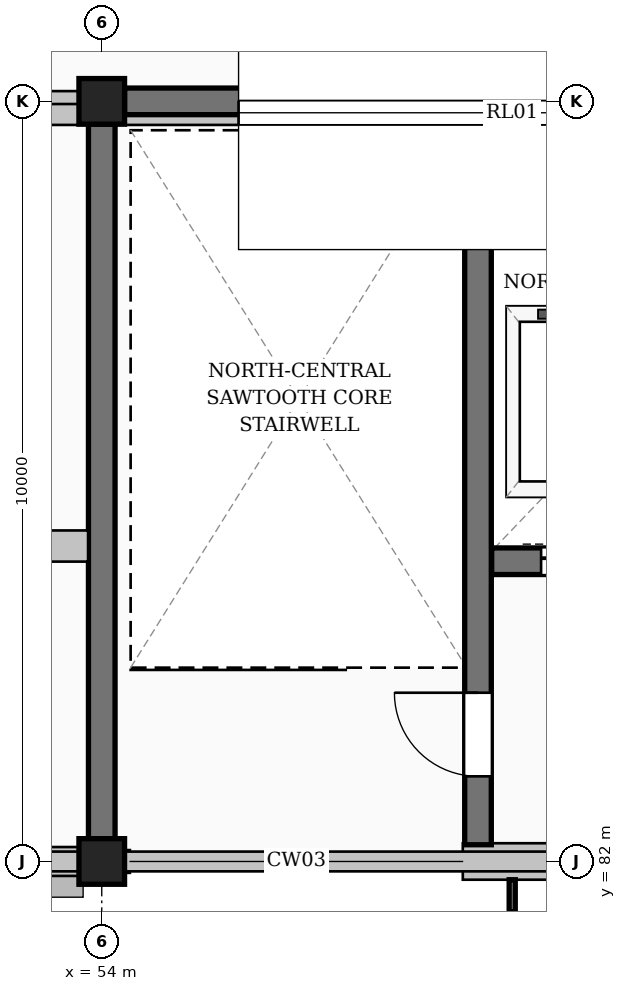
"""IFC4 building model, lengths in metres.
Left out: names, types, materials, properties, quantities, classifications, styles, units other than length and angle.
Written with IfcOpenShell. Run it as: python <this file> out.ifc"""

import sys

from ifc_helpers import new_model, si_unit, direction, frame, frame_2d, origin, origin_2d, place, context, subcontext, project, spatial, rectangle, extrude, element, fill, save


model = new_model("IFC4")
c1 = context("Model", 3, precision=1e-05, world=origin(), true_north=direction((0.0, 1.0)))
c2 = subcontext(c1, "Body", "Model", "MODEL_VIEW")
j1 = project(units=[si_unit("LENGTHUNIT", "METRE"), si_unit("PLANEANGLEUNIT", "RADIAN")], contexts=[c1])
p1 = place(None, origin())
s1 = spatial("IfcSite", under=j1, at=p1, CompositionType="ELEMENT")
p2 = place(p1, origin())
s2 = spatial("IfcBuilding", under=s1, at=p2, CompositionType="ELEMENT")
p3 = place(p2, frame((0.0, 0.0, 28.8)))
s3 = spatial("IfcBuildingStorey", under=s2, at=p3, CompositionType="ELEMENT", Elevation=28.8)
for number, where, z_axis, x_axis in (
    (1, (54.0, 82.0, 0.0), (0.0, 0.0, 1.0), (1.0, 0.0, 0.0)),
    (2, (54.0, 92.0, 0.0), (0.0, 0.0, 1.0), (1.0, 0.0, 0.0)),
):
    element("IfcColumn", number, at=place(p3, frame(where, z_axis=z_axis, x_axis=x_axis)), inside=s3, PredefinedType="COLUMN", context=c2, shape_type="SweptSolid", body=[
        extrude(rectangle(XDim=0.6, YDim=0.6, at=origin_2d()), origin(), (0.0, 0.0, 1.0), 5.4),
    ])
p4 = place(p3, frame((43.345, 82.0, 0.0), z_axis=(0.0, 0.0, 1.0), x_axis=(1.0, 0.0, 0.0)))
e3 = element("IfcWall", 3, at=p4, inside=s3, PredefinedType="STANDARD", context=c2, shape_type="SweptSolid", body=[
    extrude(rectangle(XDim=10.51, YDim=0.38, at=frame_2d((5.255, 0.0))), origin(), (0.0, 0.0, 1.0), 5.044),
])
p5 = place(p4, frame((4.155, 0.0, 1.0)))
e4 = element("IfcOpeningElement", 4, at=p5, cuts=e3, PredefinedType="OPENING", context=c2, shape_type="SweptSolid", body=[
    extrude(rectangle(XDim=2.2, YDim=3.0, at=frame_2d((1.1, 1.5))), frame((0.0, 0.2, 0.0), z_axis=(0.0, -1.0, 0.0), x_axis=(1.0, 0.0, 0.0)), (0.0, 0.0, 1.0), 0.4),
])
p6 = place(p3, frame((58.75, 82.0, 0.0), z_axis=(0.0, 0.0, 1.0), x_axis=(1.0, 0.0, 0.0)))
e5 = element("IfcWall", 5, at=p6, inside=s3, PredefinedType="STANDARD", context=c2, shape_type="SweptSolid", body=[
    extrude(rectangle(XDim=1.3, YDim=0.48, at=frame_2d((0.65, 0.0))), origin(), (0.0, 0.0, 1.0), 5.044),
])
p7 = place(p3, frame((54.145, 82.0, 0.0), z_axis=(0.0, 0.0, 1.0), x_axis=(1.0, 0.0, 0.0)))
e6 = element("IfcWall", 6, at=p7, inside=s3, PredefinedType="STANDARD", context=c2, shape_type="SweptSolid", body=[
    extrude(rectangle(XDim=0.225, YDim=0.3, at=frame_2d((0.113, 0.0))), origin(), (0.0, 0.0, 1.0), 5.16),
])
p8 = place(p3, frame((43.36, 91.85, 5.4), z_axis=(0.0, 0.0, 1.0), x_axis=(1.0, 0.0, 0.0)))
e7 = element("IfcWall", 7, at=p8, inside=s3, PredefinedType="STANDARD", context=c2, shape_type="SweptSolid", body=[
    extrude(rectangle(XDim=10.48, YDim=0.32, at=frame_2d((5.24, 0.0))), origin(), (0.0, 0.0, 1.0), 2.45),
])
p9 = place(p8, frame((1.64, 0.0, 0.45)))
e8 = element("IfcOpeningElement", 8, at=p9, cuts=e7, PredefinedType="OPENING", context=c2, shape_type="SweptSolid", body=[
    extrude(rectangle(XDim=7.2, YDim=1.5, at=frame_2d((3.6, 0.75))), frame((0.0, 0.17, 0.0), z_axis=(0.0, -1.0, 0.0), x_axis=(1.0, 0.0, 0.0)), (0.0, 0.0, 1.0), 0.34),
])
p10 = place(p3, frame((54.16, 91.85, 5.4), z_axis=(0.0, 0.0, 1.0), x_axis=(1.0, 0.0, 0.0)))
e9 = element("IfcWall", 9, at=p10, inside=s3, PredefinedType="STANDARD", context=c2, shape_type="SweptSolid", body=[
    extrude(rectangle(XDim=10.48, YDim=0.32, at=frame_2d((5.24, 0.0))), origin(), (0.0, 0.0, 1.0), 2.45),
])
p11 = place(p10, frame((1.64, 0.0, 0.45)))
e10 = element("IfcOpeningElement", 10, at=p11, cuts=e9, PredefinedType="OPENING", context=c2, shape_type="SweptSolid", body=[
    extrude(rectangle(XDim=7.2, YDim=1.5, at=frame_2d((3.6, 0.75))), frame((0.0, 0.17, 0.0), z_axis=(0.0, -1.0, 0.0), x_axis=(1.0, 0.0, 0.0)), (0.0, 0.0, 1.0), 0.34),
])
p12 = place(p3, frame((0.35, 82.0, 5.22), z_axis=(0.0, 0.0, 1.0), x_axis=(1.0, 0.0, 0.0)))
e11 = element("IfcWall", 11, at=p12, inside=s3, PredefinedType="PARAPET", context=c2, shape_type="SweptSolid", body=[
    extrude(rectangle(XDim=74.9, YDim=0.26, at=frame_2d((37.45, 0.0))), origin(), (0.0, 0.0, 1.0), 0.55),
])
p13 = place(p3, frame((54.3, 92.0, 0.0), z_axis=(0.0, 0.0, 1.0), x_axis=(1.0, 0.0, 0.0)))
e12 = element("IfcWall", 12, at=p13, inside=s3, PredefinedType="SHEAR", context=c2, shape_type="SweptSolid", body=[
    extrude(rectangle(XDim=10.2, YDim=0.35, at=frame_2d((5.1, 0.0))), origin(), (0.0, 0.0, 1.0), 5.16),
])
p14 = place(p3, frame((54.0, 82.3, 0.0), z_axis=(0.0, 0.0, 1.0), x_axis=(0.0, 1.0, 0.0)))
e13 = element("IfcWall", 13, at=p14, inside=s3, PredefinedType="SHEAR", context=c2, shape_type="SweptSolid", body=[
    extrude(rectangle(XDim=9.4, YDim=0.35, at=frame_2d((4.7, 0.0))), origin(), (0.0, 0.0, 1.0), 5.16),
])
p15 = place(p3, frame((58.95, 82.22, 0.0), z_axis=(0.0, 0.0, 1.0), x_axis=(0.0, 1.0, 0.0)))
e14 = element("IfcWall", 14, at=p15, inside=s3, PredefinedType="SHEAR", context=c2, shape_type="SweptSolid", body=[
    extrude(rectangle(XDim=9.605, YDim=0.35, at=frame_2d((4.802, 0.0))), origin(), (0.0, 0.0, 1.0), 5.16),
])
p16 = place(p15, frame((0.9, 0.0, 0.0)))
e15 = element("IfcOpeningElement", 15, at=p16, cuts=e14, PredefinedType="OPENING", context=c2, shape_type="SweptSolid", body=[
    extrude(rectangle(XDim=1.1, YDim=2.2, at=frame_2d((0.55, 1.1))), frame((0.0, 0.185, 0.0), z_axis=(0.0, -1.0, 0.0), x_axis=(1.0, 0.0, 0.0)), (0.0, 0.0, 1.0), 0.37),
])
p17 = place(p3, frame((59.13, 85.95, 0.0), z_axis=(0.0, 0.0, 1.0), x_axis=(1.0, 0.0, 0.0)))
e16 = element("IfcWall", 16, at=p17, inside=s3, PredefinedType="SHEAR", context=c2, shape_type="SweptSolid", body=[
    extrude(rectangle(XDim=5.49, YDim=0.35, at=frame_2d((2.745, 0.0))), origin(), (0.0, 0.0, 1.0), 5.16),
])
p18 = place(p17, frame((0.65, 0.0, 0.0)))
e17 = element("IfcOpeningElement", 17, at=p18, cuts=e16, PredefinedType="OPENING", context=c2, shape_type="SweptSolid", body=[
    extrude(rectangle(XDim=1.1, YDim=2.2, at=frame_2d((0.55, 1.1))), frame((0.0, 0.185, 0.0), z_axis=(0.0, -1.0, 0.0), x_axis=(1.0, 0.0, 0.0)), (0.0, 0.0, 1.0), 0.37),
])
p19 = place(p17, frame((2.85, 0.0, 0.0)))
e18 = element("IfcOpeningElement", 18, at=p19, cuts=e16, PredefinedType="OPENING", context=c2, shape_type="SweptSolid", body=[
    extrude(rectangle(XDim=2.0, YDim=2.5, at=frame_2d((1.0, 1.25))), frame((0.0, 0.185, 0.0), z_axis=(0.0, -1.0, 0.0), x_axis=(1.0, 0.0, 0.0)), (0.0, 0.0, 1.0), 0.37),
])
p20 = place(p3, frame((25.6, 86.15, 0.0), z_axis=(0.0, 0.0, 1.0), x_axis=(1.0, 0.0, 0.0)))
e19 = element("IfcWall", 19, at=p20, inside=s3, PredefinedType="PARTITIONING", context=c2, shape_type="SweptSolid", body=[
    extrude(rectangle(XDim=28.22, YDim=0.41, at=frame_2d((14.11, 0.0))), origin(), (0.0, 0.0, 1.0), 5.12),
])
p21 = place(p20, frame((13.235, 0.0, 0.0)))
e20 = element("IfcOpeningElement", 20, at=p21, cuts=e19, PredefinedType="OPENING", context=c2, shape_type="SweptSolid", body=[
    extrude(rectangle(XDim=1.75, YDim=2.45, at=frame_2d((0.875, 1.225))), frame((0.0, 0.215, 0.0), z_axis=(0.0, -1.0, 0.0), x_axis=(1.0, 0.0, 0.0)), (0.0, 0.0, 1.0), 0.43),
])
p22 = place(p3, frame((43.4, 92.05, 0.0), z_axis=(0.0, 0.0, 1.0), x_axis=(1.0, 0.0, 0.0)))
e21 = element("IfcWall", 21, at=p22, inside=s3, PredefinedType="PARTITIONING", context=c2, shape_type="SweptSolid", body=[
    extrude(rectangle(XDim=10.42, YDim=0.17, at=frame_2d((5.21, 0.0))), origin(), (0.0, 0.0, 1.0), 5.044),
])
p23 = place(p22, frame((4.01, 0.0, 0.0)))
e22 = element("IfcOpeningElement", 22, at=p23, cuts=e21, PredefinedType="OPENING", context=c2, shape_type="SweptSolid", body=[
    extrude(rectangle(XDim=2.4, YDim=2.8, at=frame_2d((1.2, 1.4))), frame((0.0, 0.095, 0.0), z_axis=(0.0, -1.0, 0.0), x_axis=(1.0, 0.0, 0.0)), (0.0, 0.0, 1.0), 0.19),
])
p24 = place(p11, origin())
e23 = element("IfcWindow", 23, at=p24, inside=s3, PartitioningType="SINGLE_PANEL", PredefinedType="SKYLIGHT", context=c2, shape_type="SweptSolid", body=[
    extrude(rectangle(XDim=7.2, YDim=1.5, at=frame_2d((3.6, 0.75))), frame((0.0, 0.03, 0.0), z_axis=(0.0, -1.0, 0.0), x_axis=(1.0, 0.0, 0.0)), (0.0, 0.0, 1.0), 0.06),
])
fill(e10, e23)
p25 = place(p16, origin())
e24 = element("IfcDoor", 24, at=p25, inside=s3, OperationType="SINGLE_SWING_RIGHT", PredefinedType="DOOR", context=c2, shape_type="SweptSolid", body=[
    extrude(rectangle(XDim=1.1, YDim=2.2, at=frame_2d((0.55, 1.1))), frame((0.0, 0.025, 0.0), z_axis=(0.0, -1.0, 0.0), x_axis=(1.0, 0.0, 0.0)), (0.0, 0.0, 1.0), 0.05),
])
fill(e15, e24)
p26 = place(p18, origin())
e25 = element("IfcDoor", 25, at=p26, inside=s3, OperationType="DOUBLE_DOOR_SLIDING", PredefinedType="DOOR", context=c2, shape_type="SweptSolid", body=[
    extrude(rectangle(XDim=1.1, YDim=2.2, at=frame_2d((0.55, 1.1))), frame((0.0, 0.025, 0.0), z_axis=(0.0, -1.0, 0.0), x_axis=(1.0, 0.0, 0.0)), (0.0, 0.0, 1.0), 0.05),
])
fill(e17, e25)
save(model, sys.argv[1])
